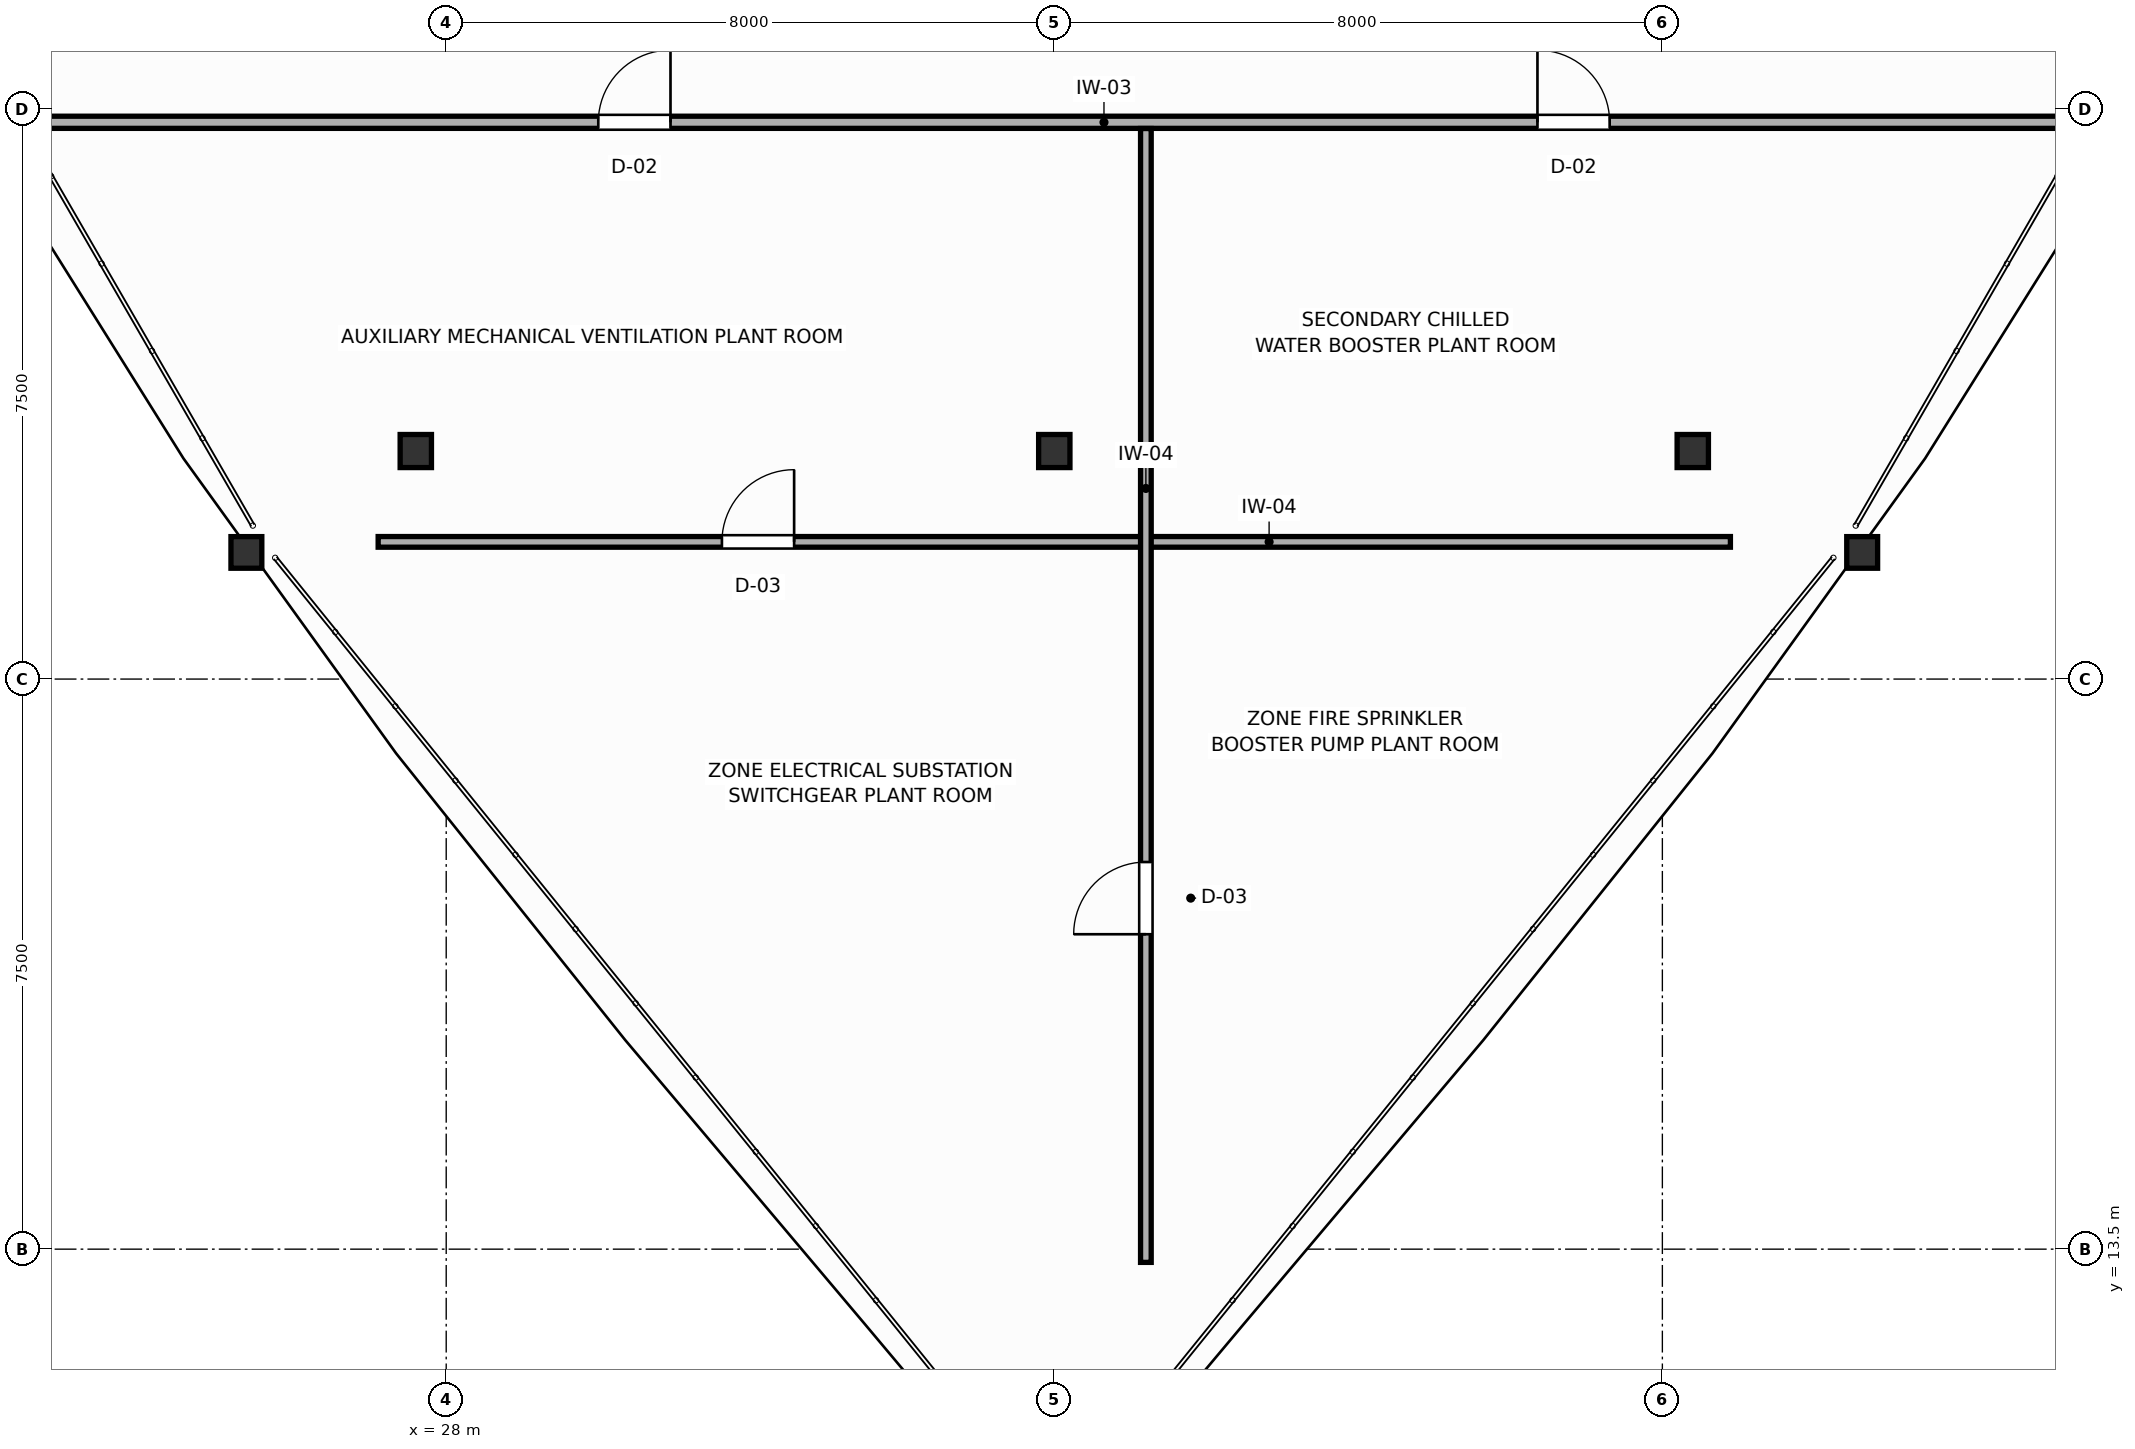
"""IFC4 building model, lengths in metres.
Left out: names, types, materials, properties, quantities, classifications, styles, units other than length and angle.
Written with IfcOpenShell. Run it as: python <this file> out.ifc"""

import sys

from ifc_helpers import new_model, si_unit, direction, frame, frame_2d, origin, origin_2d, place, context, subcontext, project, spatial, rectangle, i_section, extrude, source, transform, mapped, element, fill, save


model = new_model("IFC4")
c1 = context("Model", 3, precision=1e-05, world=origin(), true_north=direction((0.0, 1.0)))
c2 = subcontext(c1, "Body", "Model", "MODEL_VIEW")
j1 = project(units=[si_unit("LENGTHUNIT", "METRE"), si_unit("PLANEANGLEUNIT", "RADIAN")], contexts=[c1])
p1 = place(None, origin())
s1 = spatial("IfcSite", under=j1, at=p1, CompositionType="ELEMENT")
p2 = place(p1, origin())
s2 = spatial("IfcBuilding", under=s1, at=p2, CompositionType="ELEMENT")
p3 = place(p2, frame((0.0, 0.0, 201.0)))
s3 = spatial("IfcBuildingStorey", under=s2, at=p3, CompositionType="ELEMENT", Elevation=201.0)
m1 = source(origin(), c2, "Body", "SweptSolid", [
    extrude(i_section(OverallWidth=0.412, OverallDepth=0.435, WebThickness=0.033, FlangeThickness=0.053, FilletRadius=0.015, at=origin_2d()), origin(), (0.0, 0.0, 1.0), 4.8),
])
for number, where, z_axis, x_axis in (
    (1, (27.6, 24.0, 0.0), (0.0, 0.0, 1.0), (1.0, 0.0, 0.0)),
    (2, (44.4, 24.0, 0.0), (0.0, 0.0, 1.0), (1.0, 0.0, 0.0)),
    (3, (36.0, 24.0, 0.0), (0.0, 0.0, 1.0), (1.0, 0.0, 0.0)),
):
    element("IfcColumn", number, at=place(p3, frame(where, z_axis=z_axis, x_axis=x_axis)), inside=s3, PredefinedType="COLUMN", context=c2, shape_type="MappedRepresentation", body=[
        mapped(m1, transform((0.0, 0.0, 0.0), scale=1.0)),
    ])
m2 = source(origin(), c2, "Body", "SweptSolid", [
    extrude(i_section(OverallWidth=0.406, OverallDepth=0.416, WebThickness=0.027, FlangeThickness=0.044, FilletRadius=0.015, at=origin_2d()), origin(), (0.0, 0.0, 1.0), 4.8),
])
for number, where, z_axis, x_axis in (
    (4, (25.371, 22.666, 0.0), (0.0, 0.0, 1.0), (1.0, 0.0, 0.0)),
    (5, (46.629, 22.666, 0.0), (0.0, 0.0, 1.0), (1.0, 0.0, 0.0)),
):
    element("IfcColumn", number, at=place(p3, frame(where, z_axis=z_axis, x_axis=x_axis)), inside=s3, PredefinedType="COLUMN", context=c2, shape_type="MappedRepresentation", body=[
        mapped(m2, transform((0.0, 0.0, 0.0), scale=1.0)),
    ])
p4 = place(p3, frame((22.124, 28.325, 0.0), z_axis=(0.0, 0.0, 1.0), x_axis=(1.0, 0.0, 0.0)))
e6 = element("IfcWall", 6, at=p4, inside=s3, PredefinedType="PARTITIONING", context=c2, shape_type="SweptSolid", body=[
    extrude(rectangle(XDim=27.752, YDim=0.16, at=frame_2d((13.876, 0.0))), origin(), (0.0, 0.0, 1.0), 4.61),
])
p5 = place(p4, frame((7.877, 0.0, 0.0)))
e7 = element("IfcOpeningElement", 7, at=p5, cuts=e6, PredefinedType="OPENING", context=c2, shape_type="SweptSolid", body=[
    extrude(rectangle(XDim=0.95, YDim=2.05, at=frame_2d((0.475, 1.025))), frame((0.0, 0.09, 0.0), z_axis=(0.0, -1.0, 0.0), x_axis=(1.0, 0.0, 0.0)), (0.0, 0.0, 1.0), 0.18),
])
p6 = place(p4, frame((20.233, 0.0, 0.0)))
e8 = element("IfcOpeningElement", 8, at=p6, cuts=e6, PredefinedType="OPENING", context=c2, shape_type="SweptSolid", body=[
    extrude(rectangle(XDim=0.95, YDim=2.05, at=frame_2d((0.475, 1.025))), frame((0.0, 0.09, 0.0), z_axis=(0.0, -1.0, 0.0), x_axis=(1.0, 0.0, 0.0)), (0.0, 0.0, 1.0), 0.18),
])
p7 = place(p3, frame((27.105, 22.805, 0.0), z_axis=(0.0, 0.0, 1.0), x_axis=(1.0, 0.0, 0.0)))
e9 = element("IfcWall", 9, at=p7, inside=s3, PredefinedType="PARTITIONING", context=c2, shape_type="SweptSolid", body=[
    extrude(rectangle(XDim=17.791, YDim=0.14, at=frame_2d((8.895, 0.0))), origin(), (0.0, 0.0, 1.0), 2.97),
])
p8 = place(p7, frame((4.522, 0.0, 0.0)))
e10 = element("IfcOpeningElement", 10, at=p8, cuts=e9, PredefinedType="OPENING", context=c2, shape_type="SweptSolid", body=[
    extrude(rectangle(XDim=0.95, YDim=2.05, at=frame_2d((0.475, 1.025))), frame((0.0, 0.08, 0.0), z_axis=(0.0, -1.0, 0.0), x_axis=(1.0, 0.0, 0.0)), (0.0, 0.0, 1.0), 0.16),
])
p9 = place(p3, frame((37.205, 13.326, 0.0), z_axis=(0.0, 0.0, 1.0), x_axis=(0.0, 1.0, 0.0)))
e11 = element("IfcWall", 11, at=p9, inside=s3, PredefinedType="PARTITIONING", context=c2, shape_type="SweptSolid", body=[
    extrude(rectangle(XDim=14.917, YDim=0.14, at=frame_2d((7.458, 0.0))), origin(), (0.0, 0.0, 1.0), 4.61),
])
p10 = place(p9, frame((4.317, 0.0, 0.0)))
e12 = element("IfcOpeningElement", 12, at=p10, cuts=e11, PredefinedType="OPENING", context=c2, shape_type="SweptSolid", body=[
    extrude(rectangle(XDim=0.95, YDim=2.05, at=frame_2d((0.475, 1.025))), frame((0.0, 0.08, 0.0), z_axis=(0.0, -1.0, 0.0), x_axis=(1.0, 0.0, 0.0)), (0.0, 0.0, 1.0), 0.16),
])
p11 = place(p5, origin())
e13 = element("IfcDoor", 13, at=p11, inside=s3, OperationType="SINGLE_SWING_RIGHT", PredefinedType="DOOR", context=c2, shape_type="SweptSolid", body=[
    extrude(rectangle(XDim=0.95, YDim=2.05, at=frame_2d((0.475, 1.025))), frame((0.0, 0.025, 0.0), z_axis=(0.0, -1.0, 0.0), x_axis=(1.0, 0.0, 0.0)), (0.0, 0.0, 1.0), 0.05),
])
fill(e7, e13)
p12 = place(p6, origin())
e14 = element("IfcDoor", 14, at=p12, inside=s3, OperationType="SINGLE_SWING_LEFT", PredefinedType="DOOR", context=c2, shape_type="SweptSolid", body=[
    extrude(rectangle(XDim=0.95, YDim=2.05, at=frame_2d((0.475, 1.025))), frame((0.0, 0.025, 0.0), z_axis=(0.0, -1.0, 0.0), x_axis=(1.0, 0.0, 0.0)), (0.0, 0.0, 1.0), 0.05),
])
fill(e8, e14)
p13 = place(p8, origin())
e15 = element("IfcDoor", 15, at=p13, inside=s3, OperationType="SINGLE_SWING_RIGHT", PredefinedType="DOOR", context=c2, shape_type="SweptSolid", body=[
    extrude(rectangle(XDim=0.95, YDim=2.05, at=frame_2d((0.475, 1.025))), frame((0.0, 0.025, 0.0), z_axis=(0.0, -1.0, 0.0), x_axis=(1.0, 0.0, 0.0)), (0.0, 0.0, 1.0), 0.05),
])
fill(e10, e15)
p14 = place(p10, origin())
e16 = element("IfcDoor", 16, at=p14, inside=s3, OperationType="SINGLE_SWING_LEFT", PredefinedType="DOOR", context=c2, shape_type="SweptSolid", body=[
    extrude(rectangle(XDim=0.95, YDim=2.05, at=frame_2d((0.475, 1.025))), frame((0.0, 0.025, 0.0), z_axis=(0.0, -1.0, 0.0), x_axis=(1.0, 0.0, 0.0)), (0.0, 0.0, 1.0), 0.05),
])
fill(e12, e16)
save(model, sys.argv[1])
